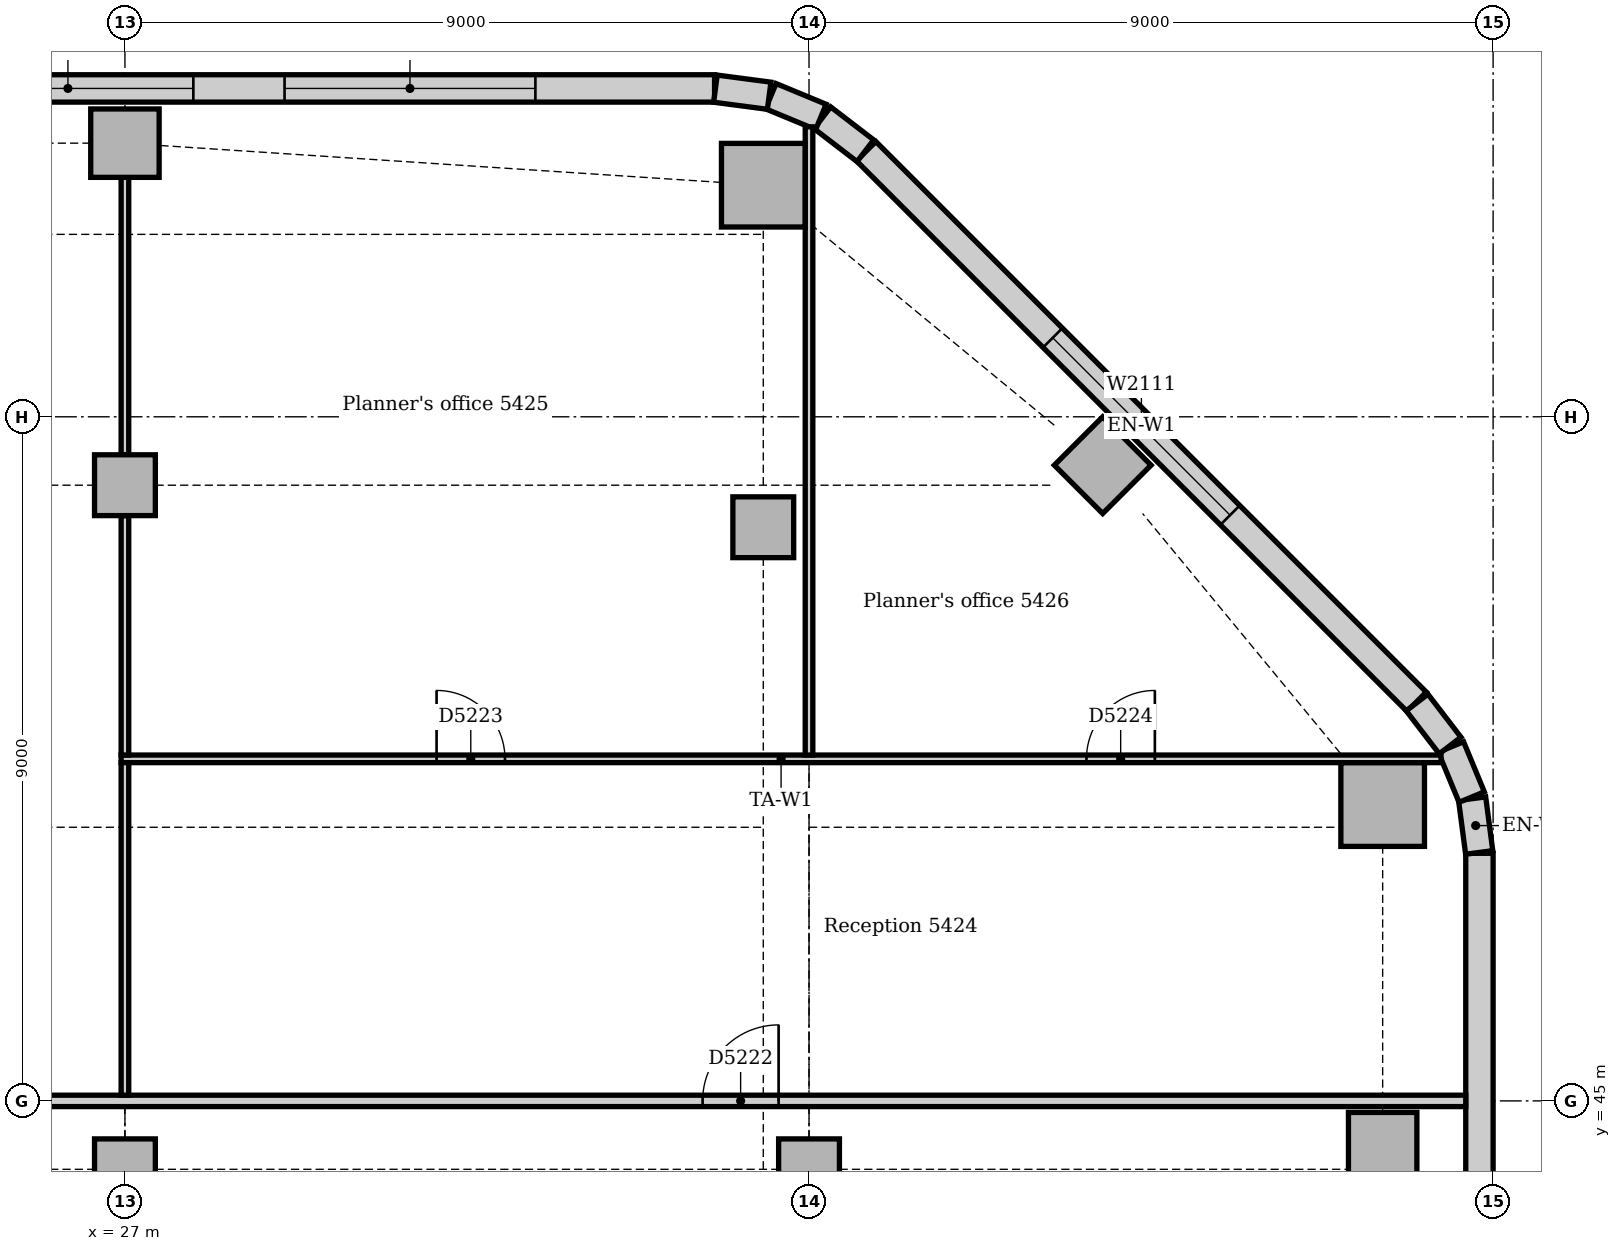
"""IFC4 building model, lengths in metres.
Left out: names, types, materials, properties, quantities, classifications, styles, units other than length and angle.
Written with IfcOpenShell. Run it as: python <this file> out.ifc"""

import sys

from ifc_helpers import new_model, si_unit, direction, frame, frame_2d, origin, origin_2d, place, context, subcontext, project, spatial, rectangle, extrude, element, fill, save


model = new_model("IFC4")
c1 = context("Model", 3, precision=1e-05, world=origin(), true_north=direction((0.0, 1.0)))
c2 = subcontext(c1, "Body", "Model", "MODEL_VIEW")
j1 = project(units=[si_unit("LENGTHUNIT", "METRE"), si_unit("PLANEANGLEUNIT", "RADIAN")], contexts=[c1])
p1 = place(None, origin())
s1 = spatial("IfcSite", under=j1, at=p1, CompositionType="ELEMENT")
p2 = place(p1, origin())
s2 = spatial("IfcBuilding", under=s1, at=p2, CompositionType="ELEMENT")
p3 = place(p2, frame((0.0, 0.0, 226.0)))
s3 = spatial("IfcBuildingStorey", under=s2, at=p3, CompositionType="ELEMENT", Elevation=226.0)
for number, where, z_axis, x_axis in (
    (1, (43.547, 48.898, 0.0), (0.0, 0.0, 1.0), (1.0, 0.0, 0.0)),
    (2, (35.398, 57.047, 0.0), (0.0, 0.0, 1.0), (1.0, 0.0, 0.0)),
):
    element("IfcColumn", number, at=place(p3, frame(where, z_axis=z_axis, x_axis=x_axis)), inside=s3, PredefinedType="COLUMN", context=c2, shape_type="SweptSolid", body=[
        extrude(rectangle(XDim=1.1, YDim=1.1, at=origin_2d()), origin(), (0.0, 0.0, 1.0), 3.85),
    ])
for number, where, z_axis, x_axis in (
    (3, (43.547, 44.398, 0.0), (0.0, 0.0, 1.0), (1.0, 0.0, 0.0)),
    (4, (39.864, 53.364, 0.0), (0.0, 0.0, 1.0), (0.707, 0.707, 0.0)),
    (5, (27.0, 57.6, 0.0), (0.0, 0.0, 1.0), (1.0, 0.0, 0.0)),
):
    element("IfcColumn", number, at=place(p3, frame(where, z_axis=z_axis, x_axis=x_axis)), inside=s3, PredefinedType="COLUMN", context=c2, shape_type="SweptSolid", body=[
        extrude(rectangle(XDim=0.9, YDim=0.9, at=origin_2d()), origin(), (0.0, 0.0, 1.0), 3.85),
    ])
for number, where, z_axis, x_axis in (
    (6, (27.0, 44.1, 0.0), (0.0, 0.0, 1.0), (1.0, 0.0, 0.0)),
    (7, (27.0, 53.1, 0.0), (0.0, 0.0, 1.0), (1.0, 0.0, 0.0)),
    (8, (36.0, 44.1, 0.0), (0.0, 0.0, 1.0), (1.0, 0.0, 0.0)),
    (9, (35.398, 52.547, 0.0), (0.0, 0.0, 1.0), (1.0, 0.0, 0.0)),
):
    element("IfcColumn", number, at=place(p3, frame(where, z_axis=z_axis, x_axis=x_axis)), inside=s3, PredefinedType="COLUMN", context=c2, shape_type="SweptSolid", body=[
        extrude(rectangle(XDim=0.8, YDim=0.8, at=origin_2d()), origin(), (0.0, 0.0, 1.0), 3.85),
    ])
p4 = place(p3, frame((44.82, 23.743, 0.0), z_axis=(0.0, 0.0, 1.0), x_axis=(0.0, 1.0, 0.0)))
e10 = element("IfcWall", 10, at=p4, inside=s3, PredefinedType="STANDARD", context=c2, shape_type="SweptSolid", body=[
    extrude(rectangle(XDim=24.515, YDim=0.36, at=frame_2d((12.257, 0.0))), origin(), (0.0, 0.0, 1.0), 3.85),
])
p5 = place(p4, frame((3.857, 0.0, 0.9)))
e11 = element("IfcOpeningElement", 11, at=p5, cuts=e10, PredefinedType="OPENING", context=c2, shape_type="SweptSolid", body=[
    extrude(rectangle(XDim=3.3, YDim=1.6, at=frame_2d((1.65, 0.8))), frame((0.0, 0.19, 0.0), z_axis=(0.0, -1.0, 0.0), x_axis=(1.0, 0.0, 0.0)), (0.0, 0.0, 1.0), 0.38),
])
p6 = place(p4, frame((8.357, 0.0, 0.9)))
e12 = element("IfcOpeningElement", 12, at=p6, cuts=e10, PredefinedType="OPENING", context=c2, shape_type="SweptSolid", body=[
    extrude(rectangle(XDim=3.3, YDim=1.6, at=frame_2d((1.65, 0.8))), frame((0.0, 0.19, 0.0), z_axis=(0.0, -1.0, 0.0), x_axis=(1.0, 0.0, 0.0)), (0.0, 0.0, 1.0), 0.38),
])
p7 = place(p4, frame((12.857, 0.0, 0.9)))
e13 = element("IfcOpeningElement", 13, at=p7, cuts=e10, PredefinedType="OPENING", context=c2, shape_type="SweptSolid", body=[
    extrude(rectangle(XDim=3.3, YDim=1.6, at=frame_2d((1.65, 0.8))), frame((0.0, 0.19, 0.0), z_axis=(0.0, -1.0, 0.0), x_axis=(1.0, 0.0, 0.0)), (0.0, 0.0, 1.0), 0.38),
])
p8 = place(p4, frame((18.457, 0.0, 0.9)))
e14 = element("IfcOpeningElement", 14, at=p8, cuts=e10, PredefinedType="OPENING", context=c2, shape_type="SweptSolid", body=[
    extrude(rectangle(XDim=1.8, YDim=1.6, at=frame_2d((0.9, 0.8))), frame((0.0, 0.19, 0.0), z_axis=(0.0, -1.0, 0.0), x_axis=(1.0, 0.0, 0.0)), (0.0, 0.0, 1.0), 0.38),
])
p9 = place(p3, frame((43.994, 50.251, 0.0), z_axis=(0.0, 0.0, 1.0), x_axis=(-0.707106781187, 0.707106781187, 0.0)))
e15 = element("IfcWall", 15, at=p9, inside=s3, PredefinedType="STANDARD", context=c2, shape_type="SweptSolid", body=[
    extrude(rectangle(XDim=10.243, YDim=0.36, at=frame_2d((5.121, 0.0))), origin(), (0.0, 0.0, 1.0), 3.85),
])
p10 = place(p9, frame((3.471, 0.0, 0.9)))
e16 = element("IfcOpeningElement", 16, at=p10, cuts=e15, PredefinedType="OPENING", context=c2, shape_type="SweptSolid", body=[
    extrude(rectangle(XDim=3.3, YDim=1.6, at=frame_2d((1.65, 0.8))), frame((0.0, 0.19, 0.0), z_axis=(0.0, -1.0, 0.0), x_axis=(1.0, 0.0, 0.0)), (0.0, 0.0, 1.0), 0.38),
])
p11 = place(p3, frame((34.757, 58.32, 0.0), z_axis=(0.0, 0.0, 1.0), x_axis=(-1.0, 0.0, 0.0)))
e17 = element("IfcWall", 17, at=p11, inside=s3, PredefinedType="STANDARD", context=c2, shape_type="SweptSolid", body=[
    extrude(rectangle(XDim=30.515, YDim=0.36, at=frame_2d((15.257, 0.0))), origin(), (0.0, 0.0, 1.0), 3.85),
])
p12 = place(p11, frame((2.357, 0.0, 0.9)))
e18 = element("IfcOpeningElement", 18, at=p12, cuts=e17, PredefinedType="OPENING", context=c2, shape_type="SweptSolid", body=[
    extrude(rectangle(XDim=3.3, YDim=1.6, at=frame_2d((1.65, 0.8))), frame((0.0, 0.19, 0.0), z_axis=(0.0, -1.0, 0.0), x_axis=(1.0, 0.0, 0.0)), (0.0, 0.0, 1.0), 0.38),
])
p13 = place(p11, frame((6.857, 0.0, 0.9)))
e19 = element("IfcOpeningElement", 19, at=p13, cuts=e17, PredefinedType="OPENING", context=c2, shape_type="SweptSolid", body=[
    extrude(rectangle(XDim=3.3, YDim=1.6, at=frame_2d((1.65, 0.8))), frame((0.0, 0.19, 0.0), z_axis=(0.0, -1.0, 0.0), x_axis=(1.0, 0.0, 0.0)), (0.0, 0.0, 1.0), 0.38),
])
p14 = place(p11, frame((11.357, 0.0, 0.9)))
e20 = element("IfcOpeningElement", 20, at=p14, cuts=e17, PredefinedType="OPENING", context=c2, shape_type="SweptSolid", body=[
    extrude(rectangle(XDim=3.3, YDim=1.6, at=frame_2d((1.65, 0.8))), frame((0.0, 0.19, 0.0), z_axis=(0.0, -1.0, 0.0), x_axis=(1.0, 0.0, 0.0)), (0.0, 0.0, 1.0), 0.38),
])
p15 = place(p11, frame((15.857, 0.0, 0.9)))
e21 = element("IfcOpeningElement", 21, at=p15, cuts=e17, PredefinedType="OPENING", context=c2, shape_type="SweptSolid", body=[
    extrude(rectangle(XDim=3.3, YDim=1.6, at=frame_2d((1.65, 0.8))), frame((0.0, 0.19, 0.0), z_axis=(0.0, -1.0, 0.0), x_axis=(1.0, 0.0, 0.0)), (0.0, 0.0, 1.0), 0.38),
])
p16 = place(p11, frame((20.357, 0.0, 0.9)))
e22 = element("IfcOpeningElement", 22, at=p16, cuts=e17, PredefinedType="OPENING", context=c2, shape_type="SweptSolid", body=[
    extrude(rectangle(XDim=3.3, YDim=1.6, at=frame_2d((1.65, 0.8))), frame((0.0, 0.19, 0.0), z_axis=(0.0, -1.0, 0.0), x_axis=(1.0, 0.0, 0.0)), (0.0, 0.0, 1.0), 0.38),
])
p17 = place(p11, frame((24.857, 0.0, 0.9)))
e23 = element("IfcOpeningElement", 23, at=p17, cuts=e17, PredefinedType="OPENING", context=c2, shape_type="SweptSolid", body=[
    extrude(rectangle(XDim=3.3, YDim=1.6, at=frame_2d((1.65, 0.8))), frame((0.0, 0.19, 0.0), z_axis=(0.0, -1.0, 0.0), x_axis=(1.0, 0.0, 0.0)), (0.0, 0.0, 1.0), 0.38),
])
for number, where, z_axis, x_axis in (
    (24, (44.817, 48.269, 0.0), (0.0, 0.0, 1.0), (-0.131, 0.991, 0.0)),
    (25, (44.718, 48.997, 0.0), (0.0, 0.0, 1.0), (-0.383, 0.924, 0.0)),
):
    element("IfcWall", number, at=place(p3, frame(where, z_axis=z_axis, x_axis=x_axis)), inside=s3, PredefinedType="STANDARD", context=c2, shape_type="SweptSolid", body=[
        extrude(rectangle(XDim=0.713, YDim=0.36, at=frame_2d((0.356, 0.0))), origin(), (0.0, 0.0, 1.0), 3.85),
    ])
for number, where, z_axis, x_axis in (
    (26, (44.434, 49.675, 0.0), (0.0, 0.0, 1.0), (-0.609, 0.793, 0.0)),
    (27, (36.741, 57.5, 0.0), (0.0, 0.0, 1.0), (-0.793, 0.609, 0.0)),
):
    element("IfcWall", number, at=place(p3, frame(where, z_axis=z_axis, x_axis=x_axis)), inside=s3, PredefinedType="STANDARD", context=c2, shape_type="SweptSolid", body=[
        extrude(rectangle(XDim=0.713, YDim=0.36, at=frame_2d((0.357, 0.0))), origin(), (0.0, 0.0, 1.0), 3.85),
    ])
for number, where, z_axis, x_axis in (
    (28, (36.156, 57.945, 0.0), (0.0, 0.0, 1.0), (-0.924, 0.383, 0.0)),
    (29, (35.476, 58.224, 0.0), (0.0, 0.0, 1.0), (-0.991, 0.131, 0.0)),
):
    element("IfcWall", number, at=place(p3, frame(where, z_axis=z_axis, x_axis=x_axis)), inside=s3, PredefinedType="STANDARD", context=c2, shape_type="SweptSolid", body=[
        extrude(rectangle(XDim=0.713, YDim=0.36, at=frame_2d((0.356, 0.0))), origin(), (0.0, 0.0, 1.0), 3.85),
    ])
p18 = place(p3, frame((0.36, 45.0, 0.0), z_axis=(0.0, 0.0, 1.0), x_axis=(1.0, 0.0, 0.0)))
e30 = element("IfcWall", 30, at=p18, inside=s3, PredefinedType="PARTITIONING", context=c2, shape_type="SweptSolid", body=[
    extrude(rectangle(XDim=44.28, YDim=0.15, at=frame_2d((22.14, 0.0))), origin(), (0.0, 0.0, 1.0), 3.85),
])
p19 = place(p18, frame((9.05, 0.0, 0.0)))
e31 = element("IfcOpeningElement", 31, at=p19, cuts=e30, PredefinedType="OPENING", context=c2, shape_type="SweptSolid", body=[
    extrude(rectangle(XDim=0.9, YDim=2.1, at=frame_2d((0.45, 1.05))), frame((0.0, 0.085, 0.0), z_axis=(0.0, -1.0, 0.0), x_axis=(1.0, 0.0, 0.0)), (0.0, 0.0, 1.0), 0.17),
])
p20 = place(p18, frame((21.69, 0.0, 0.0)))
e32 = element("IfcOpeningElement", 32, at=p20, cuts=e30, PredefinedType="OPENING", context=c2, shape_type="SweptSolid", body=[
    extrude(rectangle(XDim=0.9, YDim=2.1, at=frame_2d((0.45, 1.05))), frame((0.0, 0.085, 0.0), z_axis=(0.0, -1.0, 0.0), x_axis=(1.0, 0.0, 0.0)), (0.0, 0.0, 1.0), 0.17),
])
p21 = place(p18, frame((34.24, 0.0, 0.0)))
e33 = element("IfcOpeningElement", 33, at=p21, cuts=e30, PredefinedType="OPENING", context=c2, shape_type="SweptSolid", body=[
    extrude(rectangle(XDim=1.0, YDim=2.1, at=frame_2d((0.5, 1.05))), frame((0.0, 0.085, 0.0), z_axis=(0.0, -1.0, 0.0), x_axis=(1.0, 0.0, 0.0)), (0.0, 0.0, 1.0), 0.17),
])
p22 = place(p3, frame((26.95, 49.5, 0.0), z_axis=(0.0, 0.0, 1.0), x_axis=(1.0, 0.0, 0.0)))
e34 = element("IfcWall", 34, at=p22, inside=s3, PredefinedType="PARTITIONING", context=c2, shape_type="SweptSolid", body=[
    extrude(rectangle(XDim=17.365, YDim=0.1, at=frame_2d((8.682, 0.0))), origin(), (0.0, 0.0, 1.0), 3.85),
])
p23 = place(p22, frame((4.15, 0.0, 0.0)))
e35 = element("IfcOpeningElement", 35, at=p23, cuts=e34, PredefinedType="OPENING", context=c2, shape_type="SweptSolid", body=[
    extrude(rectangle(XDim=0.9, YDim=2.1, at=frame_2d((0.45, 1.05))), frame((0.0, 0.06, 0.0), z_axis=(0.0, -1.0, 0.0), x_axis=(1.0, 0.0, 0.0)), (0.0, 0.0, 1.0), 0.12),
])
p24 = place(p22, frame((12.7, 0.0, 0.0)))
e36 = element("IfcOpeningElement", 36, at=p24, cuts=e34, PredefinedType="OPENING", context=c2, shape_type="SweptSolid", body=[
    extrude(rectangle(XDim=0.9, YDim=2.1, at=frame_2d((0.45, 1.05))), frame((0.0, 0.06, 0.0), z_axis=(0.0, -1.0, 0.0), x_axis=(1.0, 0.0, 0.0)), (0.0, 0.0, 1.0), 0.12),
])
p25 = place(p3, frame((27.0, 45.075, 0.0), z_axis=(0.0, 0.0, 1.0), x_axis=(0.0, 1.0, 0.0)))
e37 = element("IfcWall", 37, at=p25, inside=s3, PredefinedType="PARTITIONING", context=c2, shape_type="SweptSolid", body=[
    extrude(rectangle(XDim=4.375, YDim=0.1, at=frame_2d((2.188, 0.0))), origin(), (0.0, 0.0, 1.0), 3.35),
])
p26 = place(p3, frame((27.0, 49.55, 0.0), z_axis=(0.0, 0.0, 1.0), x_axis=(0.0, 1.0, 0.0)))
e38 = element("IfcWall", 38, at=p26, inside=s3, PredefinedType="PARTITIONING", context=c2, shape_type="SweptSolid", body=[
    extrude(rectangle(XDim=3.15, YDim=0.1, at=frame_2d((1.575, 0.0))), origin(), (0.0, 0.0, 1.0), 3.35),
])
p27 = place(p3, frame((27.0, 53.5, 0.0), z_axis=(0.0, 0.0, 1.0), x_axis=(0.0, 1.0, 0.0)))
e39 = element("IfcWall", 39, at=p27, inside=s3, PredefinedType="PARTITIONING", context=c2, shape_type="SweptSolid", body=[
    extrude(rectangle(XDim=3.65, YDim=0.1, at=frame_2d((1.825, 0.0))), origin(), (0.0, 0.0, 1.0), 3.41),
])
p28 = place(p3, frame((36.0, 49.55, 0.0), z_axis=(0.0, 0.0, 1.0), x_axis=(0.0, 1.0, 0.0)))
e40 = element("IfcWall", 40, at=p28, inside=s3, PredefinedType="PARTITIONING", context=c2, shape_type="SweptSolid", body=[
    extrude(rectangle(XDim=8.265, YDim=0.1, at=frame_2d((4.133, 0.0))), origin(), (0.0, 0.0, 1.0), 3.35),
])
p29 = place(p10, origin())
e41 = element("IfcWindow", 41, at=p29, inside=s3, PartitioningType="SINGLE_PANEL", PredefinedType="WINDOW", context=c2, shape_type="SweptSolid", body=[
    extrude(rectangle(XDim=3.3, YDim=1.6, at=frame_2d((1.65, 0.8))), frame((0.0, 0.13, 0.0), z_axis=(0.0, -1.0, 0.0), x_axis=(1.0, 0.0, 0.0)), (0.0, 0.0, 1.0), 0.06),
])
fill(e16, e41)
p30 = place(p12, origin())
e42 = element("IfcWindow", 42, at=p30, inside=s3, PartitioningType="SINGLE_PANEL", PredefinedType="WINDOW", context=c2, shape_type="SweptSolid", body=[
    extrude(rectangle(XDim=3.3, YDim=1.6, at=frame_2d((1.65, 0.8))), frame((0.0, 0.13, 0.0), z_axis=(0.0, -1.0, 0.0), x_axis=(1.0, 0.0, 0.0)), (0.0, 0.0, 1.0), 0.06),
])
fill(e18, e42)
p31 = place(p13, origin())
e43 = element("IfcWindow", 43, at=p31, inside=s3, PartitioningType="SINGLE_PANEL", PredefinedType="WINDOW", context=c2, shape_type="SweptSolid", body=[
    extrude(rectangle(XDim=3.3, YDim=1.6, at=frame_2d((1.65, 0.8))), frame((0.0, 0.13, 0.0), z_axis=(0.0, -1.0, 0.0), x_axis=(1.0, 0.0, 0.0)), (0.0, 0.0, 1.0), 0.06),
])
fill(e19, e43)
p32 = place(p21, origin())
e44 = element("IfcDoor", 44, at=p32, inside=s3, OperationType="SINGLE_SWING_RIGHT", PredefinedType="DOOR", context=c2, shape_type="SweptSolid", body=[
    extrude(rectangle(XDim=1.0, YDim=2.1, at=frame_2d((0.5, 1.05))), frame((0.0, 0.025, 0.0), z_axis=(0.0, -1.0, 0.0), x_axis=(1.0, 0.0, 0.0)), (0.0, 0.0, 1.0), 0.05),
])
fill(e33, e44)
p33 = place(p23, origin())
e45 = element("IfcDoor", 45, at=p33, inside=s3, OperationType="SINGLE_SWING_LEFT", PredefinedType="DOOR", context=c2, shape_type="SweptSolid", body=[
    extrude(rectangle(XDim=0.9, YDim=2.1, at=frame_2d((0.45, 1.05))), frame((0.0, 0.025, 0.0), z_axis=(0.0, -1.0, 0.0), x_axis=(1.0, 0.0, 0.0)), (0.0, 0.0, 1.0), 0.05),
])
fill(e35, e45)
p34 = place(p24, origin())
e46 = element("IfcDoor", 46, at=p34, inside=s3, OperationType="SINGLE_SWING_RIGHT", PredefinedType="DOOR", context=c2, shape_type="SweptSolid", body=[
    extrude(rectangle(XDim=0.9, YDim=2.1, at=frame_2d((0.45, 1.05))), frame((0.0, 0.025, 0.0), z_axis=(0.0, -1.0, 0.0), x_axis=(1.0, 0.0, 0.0)), (0.0, 0.0, 1.0), 0.05),
])
fill(e36, e46)
save(model, sys.argv[1])
